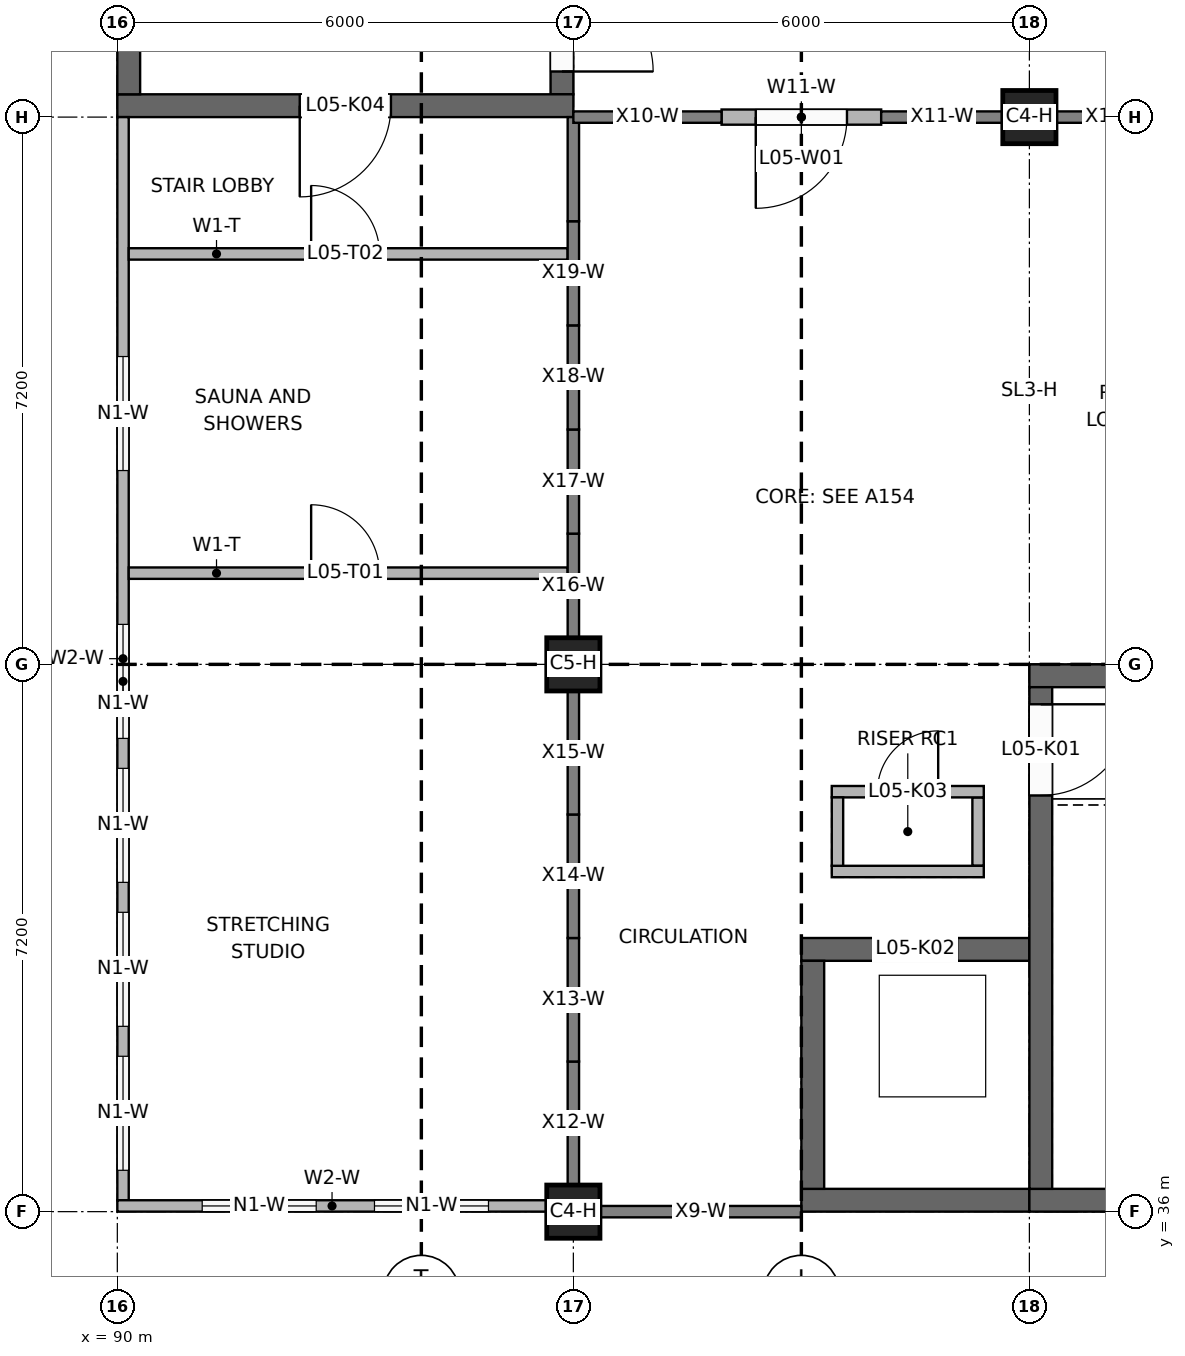
"""IFC4 building model, lengths in metres.
Left out: names, types, materials, properties, quantities, classifications, styles, units other than length and angle.
Written with IfcOpenShell. Run it as: python <this file> out.ifc"""

import sys

from ifc_helpers import new_model, si_unit, direction, frame, frame_2d, origin, origin_2d, place, context, subcontext, project, spatial, rectangle, extrude, element, fill, save


model = new_model("IFC4")
c1 = context("Model", 3, precision=1e-05, world=origin(), true_north=direction((0.0, 1.0)))
c2 = subcontext(c1, "Body", "Model", "MODEL_VIEW")
j1 = project(units=[si_unit("LENGTHUNIT", "METRE"), si_unit("PLANEANGLEUNIT", "RADIAN")], contexts=[c1])
p1 = place(None, origin())
s1 = spatial("IfcSite", under=j1, at=p1, CompositionType="ELEMENT")
p2 = place(p1, origin())
s2 = spatial("IfcBuilding", under=s1, at=p2, CompositionType="ELEMENT")
p3 = place(p2, frame((0.0, 0.0, 21.0)))
s3 = spatial("IfcBuildingStorey", under=s2, at=p3, CompositionType="ELEMENT", Elevation=21.0)
for number, where, z_axis, x_axis in (
    (1, (102.0, 36.15, 0.0), (0.0, 0.0, 1.0), (1.0, 0.0, 0.0)),
    (2, (102.0, 43.05, 0.0), (0.0, 0.0, 1.0), (1.0, 0.0, 0.0)),
):
    element("IfcWall", number, at=place(p3, frame(where, z_axis=z_axis, x_axis=x_axis)), inside=s3, PredefinedType="SHEAR", context=c2, shape_type="SweptSolid", body=[
        extrude(rectangle(XDim=6.0, YDim=0.3, at=frame_2d((3.0, 0.0))), origin(), (0.0, 0.0, 1.0), 2.75),
    ])
p4 = place(p3, frame((102.15, 36.3, 0.0), z_axis=(0.0, 0.0, 1.0), x_axis=(0.0, 1.0, 0.0)))
e3 = element("IfcWall", 3, at=p4, inside=s3, PredefinedType="SHEAR", context=c2, shape_type="SweptSolid", body=[
    extrude(rectangle(XDim=6.6, YDim=0.3, at=frame_2d((3.3, 0.0))), origin(), (0.0, 0.0, 1.0), 2.75),
])
p5 = place(p4, frame((5.175, 0.0, 0.0)))
e4 = element("IfcOpeningElement", 4, at=p5, cuts=e3, PredefinedType="OPENING", context=c2, shape_type="SweptSolid", body=[
    extrude(rectangle(XDim=1.2, YDim=2.1, at=frame_2d((0.6, 1.05))), frame((0.0, 0.16, 0.0), z_axis=(0.0, -1.0, 0.0), x_axis=(1.0, 0.0, 0.0)), (0.0, 0.0, 1.0), 0.32),
])
p6 = place(p3, frame((99.0, 36.15, 0.0), z_axis=(0.0, 0.0, 1.0), x_axis=(1.0, 0.0, 0.0)))
e5 = element("IfcWall", 5, at=p6, inside=s3, PredefinedType="SHEAR", context=c2, shape_type="SweptSolid", body=[
    extrude(rectangle(XDim=3.0, YDim=0.3, at=frame_2d((1.5, 0.0))), origin(), (0.0, 0.0, 1.0), 6.15),
])
p7 = place(p3, frame((99.0, 39.45, 0.0), z_axis=(0.0, 0.0, 1.0), x_axis=(1.0, 0.0, 0.0)))
e6 = element("IfcWall", 6, at=p7, inside=s3, PredefinedType="SHEAR", context=c2, shape_type="SweptSolid", body=[
    extrude(rectangle(XDim=3.0, YDim=0.3, at=frame_2d((1.5, 0.0))), origin(), (0.0, 0.0, 1.0), 6.15),
])
p8 = place(p7, frame((0.95, 0.0, 0.0)))
e7 = element("IfcOpeningElement", 7, at=p8, cuts=e6, PredefinedType="OPENING", context=c2, shape_type="SweptSolid", body=[
    extrude(rectangle(XDim=1.1, YDim=2.1, at=frame_2d((0.55, 1.05))), frame((0.0, 0.16, 0.0), z_axis=(0.0, -1.0, 0.0), x_axis=(1.0, 0.0, 0.0)), (0.0, 0.0, 1.0), 0.32),
])
p9 = place(p3, frame((99.15, 36.3, 0.0), z_axis=(0.0, 0.0, 1.0), x_axis=(0.0, 1.0, 0.0)))
e8 = element("IfcWall", 8, at=p9, inside=s3, PredefinedType="SHEAR", context=c2, shape_type="SweptSolid", body=[
    extrude(rectangle(XDim=3.0, YDim=0.3, at=frame_2d((1.5, 0.0))), origin(), (0.0, 0.0, 1.0), 6.15),
])
p10 = place(p3, frame((90.0, 50.55, 0.0), z_axis=(0.0, 0.0, 1.0), x_axis=(1.0, 0.0, 0.0)))
e9 = element("IfcWall", 9, at=p10, inside=s3, PredefinedType="SHEAR", context=c2, shape_type="SweptSolid", body=[
    extrude(rectangle(XDim=6.0, YDim=0.3, at=frame_2d((3.0, 0.0))), origin(), (0.0, 0.0, 1.0), 2.4),
])
p11 = place(p10, frame((2.4, 0.0, 0.0)))
e10 = element("IfcOpeningElement", 10, at=p11, cuts=e9, PredefinedType="OPENING", context=c2, shape_type="SweptSolid", body=[
    extrude(rectangle(XDim=1.2, YDim=2.1, at=frame_2d((0.6, 1.05))), frame((0.0, 0.16, 0.0), z_axis=(0.0, -1.0, 0.0), x_axis=(1.0, 0.0, 0.0)), (0.0, 0.0, 1.0), 0.32),
])
p12 = place(p3, frame((90.15, 50.7, 0.0), z_axis=(0.0, 0.0, 1.0), x_axis=(0.0, 1.0, 0.0)))
e11 = element("IfcWall", 11, at=p12, inside=s3, PredefinedType="SHEAR", context=c2, shape_type="SweptSolid", body=[
    extrude(rectangle(XDim=6.6, YDim=0.3, at=frame_2d((3.3, 0.0))), origin(), (0.0, 0.0, 1.0), 2.4),
])
p13 = place(p3, frame((95.85, 50.7, 0.0), z_axis=(0.0, 0.0, 1.0), x_axis=(0.0, 1.0, 0.0)))
e12 = element("IfcWall", 12, at=p13, inside=s3, PredefinedType="SHEAR", context=c2, shape_type="SweptSolid", body=[
    extrude(rectangle(XDim=6.6, YDim=0.3, at=frame_2d((3.3, 0.0))), origin(), (0.0, 0.0, 1.0), 2.4),
])
p14 = place(p13, frame((0.3, 0.0, 0.0)))
e13 = element("IfcOpeningElement", 13, at=p14, cuts=e12, PredefinedType="OPENING", context=c2, shape_type="SweptSolid", body=[
    extrude(rectangle(XDim=1.2, YDim=2.1, at=frame_2d((0.6, 1.05))), frame((0.0, 0.16, 0.0), z_axis=(0.0, -1.0, 0.0), x_axis=(1.0, 0.0, 0.0)), (0.0, 0.0, 1.0), 0.32),
])
p15 = place(p3, frame((99.4, 40.475, 0.0), z_axis=(0.0, 0.0, 1.0), x_axis=(1.0, 0.0, 0.0)))
e14 = element("IfcWall", 14, at=p15, inside=s3, PredefinedType="SOLIDWALL", context=c2, shape_type="SweptSolid", body=[
    extrude(rectangle(XDim=2.0, YDim=0.15, at=frame_2d((1.0, 0.0))), origin(), (0.0, 0.0, 1.0), 2.75),
])
p16 = place(p3, frame((99.4, 41.525, 0.0), z_axis=(0.0, 0.0, 1.0), x_axis=(1.0, 0.0, 0.0)))
e15 = element("IfcWall", 15, at=p16, inside=s3, PredefinedType="SOLIDWALL", context=c2, shape_type="SweptSolid", body=[
    extrude(rectangle(XDim=2.0, YDim=0.15, at=frame_2d((1.0, 0.0))), origin(), (0.0, 0.0, 1.0), 2.75),
])
p17 = place(p16, frame((0.6, 0.0, 0.0)))
e16 = element("IfcOpeningElement", 16, at=p17, cuts=e15, PredefinedType="OPENING", context=c2, shape_type="SweptSolid", body=[
    extrude(rectangle(XDim=0.8, YDim=2.1, at=frame_2d((0.4, 1.05))), frame((0.0, 0.085, 0.0), z_axis=(0.0, -1.0, 0.0), x_axis=(1.0, 0.0, 0.0)), (0.0, 0.0, 1.0), 0.17),
])
for number, where, z_axis, x_axis in (
    (17, (99.475, 40.55, 0.0), (0.0, 0.0, 1.0), (0.0, 1.0, 0.0)),
    (18, (101.325, 40.55, 0.0), (0.0, 0.0, 1.0), (0.0, 1.0, 0.0)),
):
    element("IfcWall", number, at=place(p3, frame(where, z_axis=z_axis, x_axis=x_axis)), inside=s3, PredefinedType="SOLIDWALL", context=c2, shape_type="SweptSolid", body=[
        extrude(rectangle(XDim=0.9, YDim=0.15, at=frame_2d((0.45, 0.0))), origin(), (0.0, 0.0, 1.0), 2.75),
    ])
p18 = place(p3, frame((96.0, 36.0, 0.0), z_axis=(0.0, 0.0, 1.0), x_axis=(1.0, 0.0, 0.0)))
e19 = element("IfcColumn", 19, at=p18, inside=s3, PredefinedType="COLUMN", context=c2, shape_type="SweptSolid", body=[
    extrude(rectangle(XDim=0.7, YDim=0.7, at=origin_2d()), origin(), (0.0, 0.0, 1.0), 3.714),
])
p19 = place(p3, frame((96.0, 43.2, 0.0), z_axis=(0.0, 0.0, 1.0), x_axis=(1.0, 0.0, 0.0)))
e20 = element("IfcColumn", 20, at=p19, inside=s3, PredefinedType="COLUMN", context=c2, shape_type="SweptSolid", body=[
    extrude(rectangle(XDim=0.7, YDim=0.7, at=origin_2d()), origin(), (0.0, 0.0, 1.0), 2.247),
])
p20 = place(p3, frame((102.0, 50.4, 0.0), z_axis=(0.0, 0.0, 1.0), x_axis=(1.0, 0.0, 0.0)))
e21 = element("IfcColumn", 21, at=p20, inside=s3, PredefinedType="COLUMN", context=c2, shape_type="SweptSolid", body=[
    extrude(rectangle(XDim=0.7, YDim=0.7, at=origin_2d()), origin(), (0.0, 0.0, 1.0), 3.714),
])
p21 = place(p3, frame((90.075, 36.0, 0.0), z_axis=(0.0, 0.0, 1.0), x_axis=(0.0, 1.0, 0.0)))
e22 = element("IfcWall", 22, at=p21, inside=s3, PredefinedType="PARAPET", context=c2, shape_type="SweptSolid", body=[
    extrude(rectangle(XDim=14.4, YDim=0.15, at=frame_2d((7.2, 0.0))), origin(), (0.0, 0.0, 1.0), 1.1),
])
p22 = place(p3, frame((90.0, 36.075, 0.0), z_axis=(0.0, 0.0, 1.0), x_axis=(1.0, 0.0, 0.0)))
e23 = element("IfcWall", 23, at=p22, inside=s3, PredefinedType="PARAPET", context=c2, shape_type="SweptSolid", body=[
    extrude(rectangle(XDim=6.0, YDim=0.15, at=frame_2d((3.0, 0.0))), origin(), (0.0, 0.0, 1.0), 1.1),
])
p23 = place(p3, frame((90.075, 36.15, 1.1), z_axis=(0.0, 0.0, 1.0), x_axis=(0.0, 1.0, 0.0)))
e24 = element("IfcWall", 24, at=p23, inside=s3, PredefinedType="SOLIDWALL", context=c2, shape_type="SweptSolid", body=[
    extrude(rectangle(XDim=14.25, YDim=0.15, at=frame_2d((7.125, 0.0))), origin(), (0.0, 0.0, 1.0), 1.65),
])
p24 = place(p23, frame((0.394, 0.0, 0.3)))
e25 = element("IfcOpeningElement", 25, at=p24, cuts=e24, PredefinedType="OPENING", context=c2, shape_type="SweptSolid", body=[
    extrude(rectangle(XDim=1.5, YDim=1.0, at=frame_2d((0.75, 0.5))), frame((0.0, 0.085, 0.0), z_axis=(0.0, -1.0, 0.0), x_axis=(1.0, 0.0, 0.0)), (0.0, 0.0, 1.0), 0.17),
])
p25 = place(p23, frame((2.288, 0.0, 0.3)))
e26 = element("IfcOpeningElement", 26, at=p25, cuts=e24, PredefinedType="OPENING", context=c2, shape_type="SweptSolid", body=[
    extrude(rectangle(XDim=1.5, YDim=1.0, at=frame_2d((0.75, 0.5))), frame((0.0, 0.085, 0.0), z_axis=(0.0, -1.0, 0.0), x_axis=(1.0, 0.0, 0.0)), (0.0, 0.0, 1.0), 0.17),
])
p26 = place(p23, frame((4.182, 0.0, 0.3)))
e27 = element("IfcOpeningElement", 27, at=p26, cuts=e24, PredefinedType="OPENING", context=c2, shape_type="SweptSolid", body=[
    extrude(rectangle(XDim=1.5, YDim=1.0, at=frame_2d((0.75, 0.5))), frame((0.0, 0.085, 0.0), z_axis=(0.0, -1.0, 0.0), x_axis=(1.0, 0.0, 0.0)), (0.0, 0.0, 1.0), 0.17),
])
p27 = place(p23, frame((6.076, 0.0, 0.3)))
e28 = element("IfcOpeningElement", 28, at=p27, cuts=e24, PredefinedType="OPENING", context=c2, shape_type="SweptSolid", body=[
    extrude(rectangle(XDim=1.5, YDim=1.0, at=frame_2d((0.75, 0.5))), frame((0.0, 0.085, 0.0), z_axis=(0.0, -1.0, 0.0), x_axis=(1.0, 0.0, 0.0)), (0.0, 0.0, 1.0), 0.17),
])
p28 = place(p23, frame((9.6, 0.0, 0.3)))
e29 = element("IfcOpeningElement", 29, at=p28, cuts=e24, PredefinedType="OPENING", context=c2, shape_type="SweptSolid", body=[
    extrude(rectangle(XDim=1.5, YDim=1.0, at=frame_2d((0.75, 0.5))), frame((0.0, 0.085, 0.0), z_axis=(0.0, -1.0, 0.0), x_axis=(1.0, 0.0, 0.0)), (0.0, 0.0, 1.0), 0.17),
])
p29 = place(p3, frame((90.0, 36.075, 1.1), z_axis=(0.0, 0.0, 1.0), x_axis=(1.0, 0.0, 0.0)))
e30 = element("IfcWall", 30, at=p29, inside=s3, PredefinedType="SOLIDWALL", context=c2, shape_type="SweptSolid", body=[
    extrude(rectangle(XDim=5.65, YDim=0.15, at=frame_2d((2.825, 0.0))), origin(), (0.0, 0.0, 1.0), 1.65),
])
p30 = place(p29, frame((1.117, 0.0, 0.3)))
e31 = element("IfcOpeningElement", 31, at=p30, cuts=e30, PredefinedType="OPENING", context=c2, shape_type="SweptSolid", body=[
    extrude(rectangle(XDim=1.5, YDim=1.0, at=frame_2d((0.75, 0.5))), frame((0.0, 0.085, 0.0), z_axis=(0.0, -1.0, 0.0), x_axis=(1.0, 0.0, 0.0)), (0.0, 0.0, 1.0), 0.17),
])
p31 = place(p29, frame((3.383, 0.0, 0.3)))
e32 = element("IfcOpeningElement", 32, at=p31, cuts=e30, PredefinedType="OPENING", context=c2, shape_type="SweptSolid", body=[
    extrude(rectangle(XDim=1.5, YDim=1.0, at=frame_2d((0.75, 0.5))), frame((0.0, 0.085, 0.0), z_axis=(0.0, -1.0, 0.0), x_axis=(1.0, 0.0, 0.0)), (0.0, 0.0, 1.0), 0.17),
])
p32 = place(p3, frame((97.95, 50.4, 0.0), z_axis=(0.0, 0.0, 1.0), x_axis=(1.0, 0.0, 0.0)))
e33 = element("IfcWall", 33, at=p32, inside=s3, PredefinedType="SOLIDWALL", context=c2, shape_type="SweptSolid", body=[
    extrude(rectangle(XDim=2.1, YDim=0.2, at=frame_2d((1.05, 0.0))), origin(), (0.0, 0.0, 1.0), 3.714),
])
p33 = place(p32, frame((0.45, 0.0, 0.0)))
e34 = element("IfcOpeningElement", 34, at=p33, cuts=e33, PredefinedType="OPENING", context=c2, shape_type="SweptSolid", body=[
    extrude(rectangle(XDim=1.2, YDim=2.4, at=frame_2d((0.6, 1.2))), frame((0.0, 0.11, 0.0), z_axis=(0.0, -1.0, 0.0), x_axis=(1.0, 0.0, 0.0)), (0.0, 0.0, 1.0), 0.22),
])
p34 = place(p3, frame((90.15, 44.4, 0.0), z_axis=(0.0, 0.0, 1.0), x_axis=(1.0, 0.0, 0.0)))
e35 = element("IfcWall", 35, at=p34, inside=s3, PredefinedType="PARTITIONING", context=c2, shape_type="SweptSolid", body=[
    extrude(rectangle(XDim=5.775, YDim=0.15, at=frame_2d((2.888, 0.0))), origin(), (0.0, 0.0, 1.0), 2.75),
])
p35 = place(p34, frame((2.4, 0.0, 0.0)))
e36 = element("IfcOpeningElement", 36, at=p35, cuts=e35, PredefinedType="OPENING", context=c2, shape_type="SweptSolid", body=[
    extrude(rectangle(XDim=0.9, YDim=2.1, at=frame_2d((0.45, 1.05))), frame((0.0, 0.085, 0.0), z_axis=(0.0, -1.0, 0.0), x_axis=(1.0, 0.0, 0.0)), (0.0, 0.0, 1.0), 0.17),
])
p36 = place(p3, frame((90.15, 48.6, 0.0), z_axis=(0.0, 0.0, 1.0), x_axis=(1.0, 0.0, 0.0)))
e37 = element("IfcWall", 37, at=p36, inside=s3, PredefinedType="PARTITIONING", context=c2, shape_type="SweptSolid", body=[
    extrude(rectangle(XDim=5.775, YDim=0.15, at=frame_2d((2.888, 0.0))), origin(), (0.0, 0.0, 1.0), 2.75),
])
p37 = place(p36, frame((2.4, 0.0, 0.0)))
e38 = element("IfcOpeningElement", 38, at=p37, cuts=e37, PredefinedType="OPENING", context=c2, shape_type="SweptSolid", body=[
    extrude(rectangle(XDim=0.9, YDim=2.1, at=frame_2d((0.45, 1.05))), frame((0.0, 0.085, 0.0), z_axis=(0.0, -1.0, 0.0), x_axis=(1.0, 0.0, 0.0)), (0.0, 0.0, 1.0), 0.17),
])
p38 = place(p24, origin())
e39 = element("IfcWindow", 39, at=p38, inside=s3, PartitioningType="SINGLE_PANEL", PredefinedType="WINDOW", context=c2, shape_type="SweptSolid", body=[
    extrude(rectangle(XDim=1.5, YDim=1.0, at=frame_2d((0.75, 0.5))), frame((0.0, 0.03, 0.0), z_axis=(0.0, -1.0, 0.0), x_axis=(1.0, 0.0, 0.0)), (0.0, 0.0, 1.0), 0.06),
])
fill(e25, e39)
p39 = place(p25, origin())
e40 = element("IfcWindow", 40, at=p39, inside=s3, PartitioningType="SINGLE_PANEL", PredefinedType="WINDOW", context=c2, shape_type="SweptSolid", body=[
    extrude(rectangle(XDim=1.5, YDim=1.0, at=frame_2d((0.75, 0.5))), frame((0.0, 0.03, 0.0), z_axis=(0.0, -1.0, 0.0), x_axis=(1.0, 0.0, 0.0)), (0.0, 0.0, 1.0), 0.06),
])
fill(e26, e40)
p40 = place(p26, origin())
e41 = element("IfcWindow", 41, at=p40, inside=s3, PartitioningType="SINGLE_PANEL", PredefinedType="WINDOW", context=c2, shape_type="SweptSolid", body=[
    extrude(rectangle(XDim=1.5, YDim=1.0, at=frame_2d((0.75, 0.5))), frame((0.0, 0.03, 0.0), z_axis=(0.0, -1.0, 0.0), x_axis=(1.0, 0.0, 0.0)), (0.0, 0.0, 1.0), 0.06),
])
fill(e27, e41)
p41 = place(p27, origin())
e42 = element("IfcWindow", 42, at=p41, inside=s3, PartitioningType="SINGLE_PANEL", PredefinedType="WINDOW", context=c2, shape_type="SweptSolid", body=[
    extrude(rectangle(XDim=1.5, YDim=1.0, at=frame_2d((0.75, 0.5))), frame((0.0, 0.03, 0.0), z_axis=(0.0, -1.0, 0.0), x_axis=(1.0, 0.0, 0.0)), (0.0, 0.0, 1.0), 0.06),
])
fill(e28, e42)
p42 = place(p28, origin())
e43 = element("IfcWindow", 43, at=p42, inside=s3, PartitioningType="SINGLE_PANEL", PredefinedType="WINDOW", context=c2, shape_type="SweptSolid", body=[
    extrude(rectangle(XDim=1.5, YDim=1.0, at=frame_2d((0.75, 0.5))), frame((0.0, 0.03, 0.0), z_axis=(0.0, -1.0, 0.0), x_axis=(1.0, 0.0, 0.0)), (0.0, 0.0, 1.0), 0.06),
])
fill(e29, e43)
p43 = place(p30, origin())
e44 = element("IfcWindow", 44, at=p43, inside=s3, PartitioningType="SINGLE_PANEL", PredefinedType="WINDOW", context=c2, shape_type="SweptSolid", body=[
    extrude(rectangle(XDim=1.5, YDim=1.0, at=frame_2d((0.75, 0.5))), frame((0.0, 0.03, 0.0), z_axis=(0.0, -1.0, 0.0), x_axis=(1.0, 0.0, 0.0)), (0.0, 0.0, 1.0), 0.06),
])
fill(e31, e44)
p44 = place(p31, origin())
e45 = element("IfcWindow", 45, at=p44, inside=s3, PartitioningType="SINGLE_PANEL", PredefinedType="WINDOW", context=c2, shape_type="SweptSolid", body=[
    extrude(rectangle(XDim=1.5, YDim=1.0, at=frame_2d((0.75, 0.5))), frame((0.0, 0.03, 0.0), z_axis=(0.0, -1.0, 0.0), x_axis=(1.0, 0.0, 0.0)), (0.0, 0.0, 1.0), 0.06),
])
fill(e32, e45)
p45 = place(p33, frame((1.2, 0.0, 0.0), z_axis=(0.0, 0.0, 1.0), x_axis=(-1.0, 0.0, 0.0)))
e46 = element("IfcDoor", 46, at=p45, inside=s3, OperationType="SINGLE_SWING_RIGHT", PredefinedType="DOOR", context=c2, shape_type="SweptSolid", body=[
    extrude(rectangle(XDim=1.2, YDim=2.4, at=frame_2d((0.6, 1.2))), frame((0.0, 0.025, 0.0), z_axis=(0.0, -1.0, 0.0), x_axis=(1.0, 0.0, 0.0)), (0.0, 0.0, 1.0), 0.05),
])
fill(e34, e46)
p46 = place(p5, frame((1.2, 0.0, 0.0), z_axis=(0.0, 0.0, 1.0), x_axis=(-1.0, 0.0, 0.0)))
e47 = element("IfcDoor", 47, at=p46, inside=s3, OperationType="SINGLE_SWING_LEFT", PredefinedType="DOOR", context=c2, shape_type="SweptSolid", body=[
    extrude(rectangle(XDim=1.2, YDim=2.1, at=frame_2d((0.6, 1.05))), frame((0.0, 0.025, 0.0), z_axis=(0.0, -1.0, 0.0), x_axis=(1.0, 0.0, 0.0)), (0.0, 0.0, 1.0), 0.05),
])
fill(e4, e47)
p47 = place(p8, origin())
e48 = element("IfcDoor", 48, at=p47, inside=s3, OperationType="DOUBLE_DOOR_SLIDING", PredefinedType="DOOR", context=c2, shape_type="SweptSolid", body=[
    extrude(rectangle(XDim=1.1, YDim=2.1, at=frame_2d((0.55, 1.05))), frame((0.0, 0.025, 0.0), z_axis=(0.0, -1.0, 0.0), x_axis=(1.0, 0.0, 0.0)), (0.0, 0.0, 1.0), 0.05),
])
fill(e7, e48)
p48 = place(p17, origin())
e49 = element("IfcDoor", 49, at=p48, inside=s3, OperationType="SINGLE_SWING_RIGHT", PredefinedType="DOOR", context=c2, shape_type="SweptSolid", body=[
    extrude(rectangle(XDim=0.8, YDim=2.1, at=frame_2d((0.4, 1.05))), frame((0.0, 0.025, 0.0), z_axis=(0.0, -1.0, 0.0), x_axis=(1.0, 0.0, 0.0)), (0.0, 0.0, 1.0), 0.05),
])
fill(e16, e49)
p49 = place(p11, frame((1.2, 0.0, 0.0), z_axis=(0.0, 0.0, 1.0), x_axis=(-1.0, 0.0, 0.0)))
e50 = element("IfcDoor", 50, at=p49, inside=s3, OperationType="SINGLE_SWING_RIGHT", PredefinedType="DOOR", context=c2, shape_type="SweptSolid", body=[
    extrude(rectangle(XDim=1.2, YDim=2.1, at=frame_2d((0.6, 1.05))), frame((0.0, 0.025, 0.0), z_axis=(0.0, -1.0, 0.0), x_axis=(1.0, 0.0, 0.0)), (0.0, 0.0, 1.0), 0.05),
])
fill(e10, e50)
p50 = place(p14, frame((1.2, 0.0, 0.0), z_axis=(0.0, 0.0, 1.0), x_axis=(-1.0, 0.0, 0.0)))
e51 = element("IfcDoor", 51, at=p50, inside=s3, OperationType="SINGLE_SWING_RIGHT", PredefinedType="DOOR", context=c2, shape_type="SweptSolid", body=[
    extrude(rectangle(XDim=1.2, YDim=2.1, at=frame_2d((0.6, 1.05))), frame((0.0, 0.025, 0.0), z_axis=(0.0, -1.0, 0.0), x_axis=(1.0, 0.0, 0.0)), (0.0, 0.0, 1.0), 0.05),
])
fill(e13, e51)
p51 = place(p35, origin())
e52 = element("IfcDoor", 52, at=p51, inside=s3, OperationType="SINGLE_SWING_LEFT", PredefinedType="DOOR", context=c2, shape_type="SweptSolid", body=[
    extrude(rectangle(XDim=0.9, YDim=2.1, at=frame_2d((0.45, 1.05))), frame((0.0, 0.025, 0.0), z_axis=(0.0, -1.0, 0.0), x_axis=(1.0, 0.0, 0.0)), (0.0, 0.0, 1.0), 0.05),
])
fill(e36, e52)
p52 = place(p37, origin())
e53 = element("IfcDoor", 53, at=p52, inside=s3, OperationType="SINGLE_SWING_LEFT", PredefinedType="DOOR", context=c2, shape_type="SweptSolid", body=[
    extrude(rectangle(XDim=0.9, YDim=2.1, at=frame_2d((0.45, 1.05))), frame((0.0, 0.025, 0.0), z_axis=(0.0, -1.0, 0.0), x_axis=(1.0, 0.0, 0.0)), (0.0, 0.0, 1.0), 0.05),
])
fill(e38, e53)
save(model, sys.argv[1])
